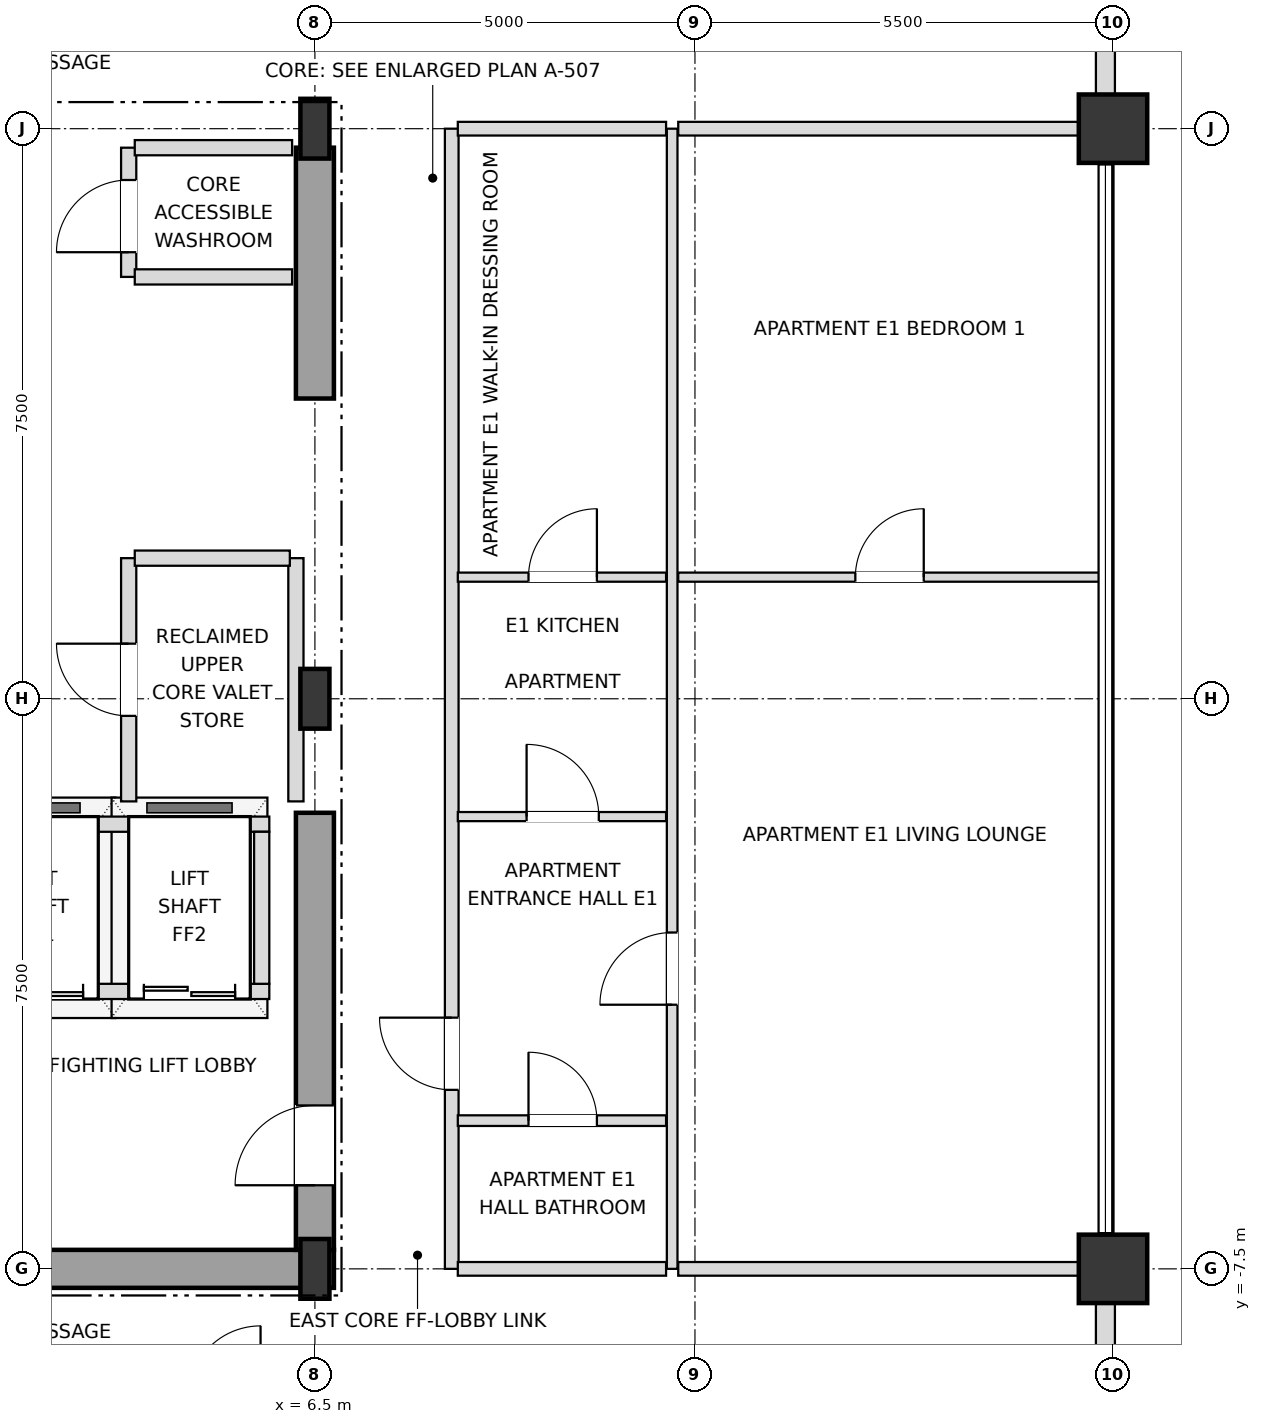
"""IFC4 building model, lengths in metres.
Left out: names, types, materials, properties, quantities, classifications, styles, units other than length and angle.
Written with IfcOpenShell. Run it as: python <this file> out.ifc"""

import sys

from ifc_helpers import new_model, si_unit, direction, frame, frame_2d, origin, origin_2d, place, context, subcontext, project, spatial, rectangle, i_section, extrude, element, fill, save


model = new_model("IFC4")
c1 = context("Model", 3, precision=1e-05, world=origin(), true_north=direction((0.0, 1.0)))
c2 = subcontext(c1, "Body", "Model", "MODEL_VIEW")
j1 = project(units=[si_unit("LENGTHUNIT", "METRE"), si_unit("PLANEANGLEUNIT", "RADIAN")], contexts=[c1])
p1 = place(None, origin())
s1 = spatial("IfcSite", under=j1, at=p1, CompositionType="ELEMENT")
p2 = place(p1, origin())
s2 = spatial("IfcBuilding", under=s1, at=p2, CompositionType="ELEMENT")
p3 = place(p2, frame((0.0, 0.0, 236.7)))
s3 = spatial("IfcBuildingStorey", under=s2, at=p3, CompositionType="ELEMENT", Elevation=236.7)
for number, where, z_axis, x_axis in (
    (1, (6.5, -7.5, 0.0), (0.0, 0.0, 1.0), (1.0, 0.0, 0.0)),
    (2, (6.5, 0.0, 0.0), (0.0, 0.0, 1.0), (1.0, 0.0, 0.0)),
    (3, (6.5, 7.5, 0.0), (0.0, 0.0, 1.0), (1.0, 0.0, 0.0)),
):
    element("IfcColumn", number, at=place(p3, frame(where, z_axis=z_axis, x_axis=x_axis)), inside=s3, PredefinedType="COLUMN", context=c2, shape_type="SweptSolid", body=[
        extrude(i_section(OverallWidth=0.382, OverallDepth=0.786, WebThickness=0.02, FlangeThickness=0.033, at=origin_2d()), origin(), (0.0, 0.0, 1.0), 3.6),
    ])
for number, where, z_axis, x_axis in (
    (4, (17.0, -7.5, 0.0), (0.0, 0.0, 1.0), (1.0, 0.0, 0.0)),
    (5, (17.0, 7.5, 0.0), (0.0, 0.0, 1.0), (1.0, 0.0, 0.0)),
):
    element("IfcColumn", number, at=place(p3, frame(where, z_axis=z_axis, x_axis=x_axis)), inside=s3, PredefinedType="USERDEFINED", context=c2, shape_type="SweptSolid", body=[
        extrude(rectangle(XDim=0.9, YDim=0.9, at=origin_2d()), origin(), (0.0, 0.0, 1.0), 3.6),
    ])
p4 = place(p3, frame((16.9, -12.555, 0.0), z_axis=(0.0, 0.0, 1.0), x_axis=(0.0, 1.0, 0.0)))
e6 = element("IfcWall", 6, at=p4, inside=s3, PredefinedType="SOLIDWALL", context=c2, shape_type="SweptSolid", body=[
    extrude(rectangle(XDim=4.61, YDim=0.25, at=frame_2d((2.305, 0.0))), origin(), (0.0, 0.0, 1.0), 2.748),
])
p5 = place(p4, frame((1.405, 0.0, 0.72)))
e7 = element("IfcOpeningElement", 7, at=p5, cuts=e6, PredefinedType="OPENING", context=c2, shape_type="SweptSolid", body=[
    extrude(rectangle(XDim=1.8, YDim=1.68, at=frame_2d((0.9, 0.84))), frame((0.0, 0.135, 0.0), z_axis=(0.0, -1.0, 0.0), x_axis=(1.0, 0.0, 0.0)), (0.0, 0.0, 1.0), 0.27),
])
p6 = place(p3, frame((16.9, 7.945, 0.0), z_axis=(0.0, 0.0, 1.0), x_axis=(0.0, 1.0, 0.0)))
e8 = element("IfcWall", 8, at=p6, inside=s3, PredefinedType="SOLIDWALL", context=c2, shape_type="SweptSolid", body=[
    extrude(rectangle(XDim=4.61, YDim=0.25, at=frame_2d((2.305, 0.0))), origin(), (0.0, 0.0, 1.0), 2.748),
])
p7 = place(p6, frame((1.405, 0.0, 0.72)))
e9 = element("IfcOpeningElement", 9, at=p7, cuts=e8, PredefinedType="OPENING", context=c2, shape_type="SweptSolid", body=[
    extrude(rectangle(XDim=1.8, YDim=1.68, at=frame_2d((0.9, 0.84))), frame((0.0, 0.135, 0.0), z_axis=(0.0, -1.0, 0.0), x_axis=(1.0, 0.0, 0.0)), (0.0, 0.0, 1.0), 0.27),
])
p8 = place(p3, frame((0.0, -7.5, 0.0), z_axis=(0.0, 0.0, 1.0), x_axis=(1.0, 0.0, 0.0)))
e10 = element("IfcWall", 10, at=p8, inside=s3, PredefinedType="SHEAR", context=c2, shape_type="SweptSolid", body=[
    extrude(rectangle(XDim=6.75, YDim=0.5, at=frame_2d((3.375, 0.0))), origin(), (0.0, 0.0, 1.0), 3.38),
])
p9 = place(p3, frame((6.5, -7.25, 0.0), z_axis=(0.0, 0.0, 1.0), x_axis=(0.0, 1.0, 0.0)))
e11 = element("IfcWall", 11, at=p9, inside=s3, PredefinedType="SHEAR", context=c2, shape_type="SweptSolid", body=[
    extrude(rectangle(XDim=5.75, YDim=0.5, at=frame_2d((2.875, 0.0))), origin(), (0.0, 0.0, 1.0), 3.38),
])
p10 = place(p9, frame((0.85, 0.0, 0.0)))
e12 = element("IfcOpeningElement", 12, at=p10, cuts=e11, PredefinedType="OPENING", context=c2, shape_type="SweptSolid", body=[
    extrude(rectangle(XDim=1.05, YDim=2.15, at=frame_2d((0.525, 1.075))), frame((0.0, 0.26, 0.0), z_axis=(0.0, -1.0, 0.0), x_axis=(1.0, 0.0, 0.0)), (0.0, 0.0, 1.0), 0.52),
])
p11 = place(p3, frame((6.5, 3.95, 0.0), z_axis=(0.0, 0.0, 1.0), x_axis=(0.0, 1.0, 0.0)))
e13 = element("IfcWall", 13, at=p11, inside=s3, PredefinedType="SHEAR", context=c2, shape_type="SweptSolid", body=[
    extrude(rectangle(XDim=3.3, YDim=0.5, at=frame_2d((1.65, 0.0))), origin(), (0.0, 0.0, 1.0), 3.38),
])
p12 = place(p3, frame((1.8, -3.85, 0.0), z_axis=(0.0, 0.0, 1.0), x_axis=(1.0, 0.0, 0.0)))
e14 = element("IfcWall", 14, at=p12, inside=s3, PredefinedType="SOLIDWALL", context=c2, shape_type="SweptSolid", body=[
    extrude(rectangle(XDim=4.1, YDim=0.2, at=frame_2d((2.05, 0.0))), origin(), (0.0, 0.0, 1.0), 3.38),
])
p13 = place(p12, frame((0.45, 0.0, 0.0)))
e15 = element("IfcOpeningElement", 15, at=p13, cuts=e14, PredefinedType="OPENING", context=c2, shape_type="SweptSolid", body=[
    extrude(rectangle(XDim=1.2, YDim=2.2, at=frame_2d((0.6, 1.1))), frame((0.0, 0.11, 0.0), z_axis=(0.0, -1.0, 0.0), x_axis=(1.0, 0.0, 0.0)), (0.0, 0.0, 1.0), 0.22),
])
p14 = place(p12, frame((2.45, 0.0, 0.0)))
e16 = element("IfcOpeningElement", 16, at=p14, cuts=e14, PredefinedType="OPENING", context=c2, shape_type="SweptSolid", body=[
    extrude(rectangle(XDim=1.2, YDim=2.2, at=frame_2d((0.6, 1.1))), frame((0.0, 0.11, 0.0), z_axis=(0.0, -1.0, 0.0), x_axis=(1.0, 0.0, 0.0)), (0.0, 0.0, 1.0), 0.22),
])
p15 = place(p3, frame((1.8, -1.65, 0.0), z_axis=(0.0, 0.0, 1.0), x_axis=(1.0, 0.0, 0.0)))
e17 = element("IfcWall", 17, at=p15, inside=s3, PredefinedType="SOLIDWALL", context=c2, shape_type="SweptSolid", body=[
    extrude(rectangle(XDim=4.1, YDim=0.2, at=frame_2d((2.05, 0.0))), origin(), (0.0, 0.0, 1.0), 3.38),
])
p16 = place(p3, frame((5.8, -3.75, 0.0), z_axis=(0.0, 0.0, 1.0), x_axis=(0.0, 1.0, 0.0)))
e18 = element("IfcWall", 18, at=p16, inside=s3, PredefinedType="SOLIDWALL", context=c2, shape_type="SweptSolid", body=[
    extrude(rectangle(XDim=2.0, YDim=0.2, at=frame_2d((1.0, 0.0))), origin(), (0.0, 0.0, 1.0), 3.38),
])
p17 = place(p3, frame((4.05, -1.35, 0.0), z_axis=(0.0, 0.0, 1.0), x_axis=(0.0, 1.0, 0.0)))
e19 = element("IfcWall", 19, at=p17, inside=s3, PredefinedType="SOLIDWALL", context=c2, shape_type="SweptSolid", body=[
    extrude(rectangle(XDim=3.2, YDim=0.2, at=frame_2d((1.6, 0.0))), origin(), (0.0, 0.0, 1.0), 3.38),
])
p18 = place(p17, frame((1.125, 0.0, 0.0)))
e20 = element("IfcOpeningElement", 20, at=p18, cuts=e19, PredefinedType="OPENING", context=c2, shape_type="SweptSolid", body=[
    extrude(rectangle(XDim=0.95, YDim=2.15, at=frame_2d((0.475, 1.075))), frame((0.0, 0.11, 0.0), z_axis=(0.0, -1.0, 0.0), x_axis=(1.0, 0.0, 0.0)), (0.0, 0.0, 1.0), 0.22),
])
p19 = place(p3, frame((4.05, 5.55, 0.0), z_axis=(0.0, 0.0, 1.0), x_axis=(0.0, 1.0, 0.0)))
e21 = element("IfcWall", 21, at=p19, inside=s3, PredefinedType="SOLIDWALL", context=c2, shape_type="SweptSolid", body=[
    extrude(rectangle(XDim=1.7, YDim=0.2, at=frame_2d((0.85, 0.0))), origin(), (0.0, 0.0, 1.0), 3.38),
])
p20 = place(p19, frame((0.325, 0.0, 0.0)))
e22 = element("IfcOpeningElement", 22, at=p20, cuts=e21, PredefinedType="OPENING", context=c2, shape_type="SweptSolid", body=[
    extrude(rectangle(XDim=0.95, YDim=2.15, at=frame_2d((0.475, 1.075))), frame((0.0, 0.11, 0.0), z_axis=(0.0, -1.0, 0.0), x_axis=(1.0, 0.0, 0.0)), (0.0, 0.0, 1.0), 0.22),
])
p21 = place(p3, frame((6.25, -1.35, 0.0), z_axis=(0.0, 0.0, 1.0), x_axis=(0.0, 1.0, 0.0)))
e23 = element("IfcWall", 23, at=p21, inside=s3, PredefinedType="SOLIDWALL", context=c2, shape_type="SweptSolid", body=[
    extrude(rectangle(XDim=3.2, YDim=0.2, at=frame_2d((1.6, 0.0))), origin(), (0.0, 0.0, 1.0), 3.38),
])
p22 = place(p3, frame((8.3, -7.5, 0.0), z_axis=(0.0, 0.0, 1.0), x_axis=(0.0, 1.0, 0.0)))
e24 = element("IfcWall", 24, at=p22, inside=s3, PredefinedType="PARTITIONING", context=c2, shape_type="SweptSolid", body=[
    extrude(rectangle(XDim=15.0, YDim=0.18, at=frame_2d((7.5, 0.0))), origin(), (0.0, 0.0, 1.0), 3.38),
])
p23 = place(p22, frame((2.355, 0.0, 0.0)))
e25 = element("IfcOpeningElement", 25, at=p23, cuts=e24, PredefinedType="OPENING", context=c2, shape_type="SweptSolid", body=[
    extrude(rectangle(XDim=0.95, YDim=2.15, at=frame_2d((0.475, 1.075))), frame((0.0, 0.1, 0.0), z_axis=(0.0, -1.0, 0.0), x_axis=(1.0, 0.0, 0.0)), (0.0, 0.0, 1.0), 0.2),
])
p24 = place(p3, frame((11.2, -7.5, 0.0), z_axis=(0.0, 0.0, 1.0), x_axis=(0.0, 1.0, 0.0)))
e26 = element("IfcWall", 26, at=p24, inside=s3, PredefinedType="PARTITIONING", context=c2, shape_type="SweptSolid", body=[
    extrude(rectangle(XDim=15.0, YDim=0.14, at=frame_2d((7.5, 0.0))), origin(), (0.0, 0.0, 1.0), 3.38),
])
p25 = place(p24, frame((3.475, 0.0, 0.0)))
e27 = element("IfcOpeningElement", 27, at=p25, cuts=e26, PredefinedType="OPENING", context=c2, shape_type="SweptSolid", body=[
    extrude(rectangle(XDim=0.95, YDim=2.1, at=frame_2d((0.475, 1.05))), frame((0.0, 0.08, 0.0), z_axis=(0.0, -1.0, 0.0), x_axis=(1.0, 0.0, 0.0)), (0.0, 0.0, 1.0), 0.16),
])
p26 = place(p3, frame((8.38, -7.5, 0.0), z_axis=(0.0, 0.0, 1.0), x_axis=(1.0, 0.0, 0.0)))
e28 = element("IfcWall", 28, at=p26, inside=s3, PredefinedType="PARTITIONING", context=c2, shape_type="SweptSolid", body=[
    extrude(rectangle(XDim=2.74, YDim=0.18, at=frame_2d((1.37, 0.0))), origin(), (0.0, 0.0, 1.0), 2.826),
])
p27 = place(p3, frame((11.28, -7.5, 0.0), z_axis=(0.0, 0.0, 1.0), x_axis=(1.0, 0.0, 0.0)))
e29 = element("IfcWall", 29, at=p27, inside=s3, PredefinedType="PARTITIONING", context=c2, shape_type="SweptSolid", body=[
    extrude(rectangle(XDim=5.62, YDim=0.18, at=frame_2d((2.81, 0.0))), origin(), (0.0, 0.0, 1.0), 2.826),
])
p28 = place(p3, frame((8.38, -5.55, 0.0), z_axis=(0.0, 0.0, 1.0), x_axis=(1.0, 0.0, 0.0)))
e30 = element("IfcWall", 30, at=p28, inside=s3, PredefinedType="PARTITIONING", context=c2, shape_type="SweptSolid", body=[
    extrude(rectangle(XDim=2.74, YDim=0.14, at=frame_2d((1.37, 0.0))), origin(), (0.0, 0.0, 1.0), 3.38),
])
p29 = place(p28, frame((0.93, 0.0, 0.0)))
e31 = element("IfcOpeningElement", 31, at=p29, cuts=e30, PredefinedType="OPENING", context=c2, shape_type="SweptSolid", body=[
    extrude(rectangle(XDim=0.9, YDim=2.1, at=frame_2d((0.45, 1.05))), frame((0.0, 0.08, 0.0), z_axis=(0.0, -1.0, 0.0), x_axis=(1.0, 0.0, 0.0)), (0.0, 0.0, 1.0), 0.16),
])
p30 = place(p3, frame((8.38, -1.55, 0.0), z_axis=(0.0, 0.0, 1.0), x_axis=(1.0, 0.0, 0.0)))
e32 = element("IfcWall", 32, at=p30, inside=s3, PredefinedType="PARTITIONING", context=c2, shape_type="SweptSolid", body=[
    extrude(rectangle(XDim=2.74, YDim=0.12, at=frame_2d((1.37, 0.0))), origin(), (0.0, 0.0, 1.0), 3.38),
])
p31 = place(p30, frame((0.905, 0.0, 0.0)))
e33 = element("IfcOpeningElement", 33, at=p31, cuts=e32, PredefinedType="OPENING", context=c2, shape_type="SweptSolid", body=[
    extrude(rectangle(XDim=0.95, YDim=2.1, at=frame_2d((0.475, 1.05))), frame((0.0, 0.07, 0.0), z_axis=(0.0, -1.0, 0.0), x_axis=(1.0, 0.0, 0.0)), (0.0, 0.0, 1.0), 0.14),
])
p32 = place(p3, frame((8.38, 1.6, 0.0), z_axis=(0.0, 0.0, 1.0), x_axis=(1.0, 0.0, 0.0)))
e34 = element("IfcWall", 34, at=p32, inside=s3, PredefinedType="PARTITIONING", context=c2, shape_type="SweptSolid", body=[
    extrude(rectangle(XDim=2.74, YDim=0.12, at=frame_2d((1.37, 0.0))), origin(), (0.0, 0.0, 1.0), 3.38),
])
p33 = place(p32, frame((0.93, 0.0, 0.0)))
e35 = element("IfcOpeningElement", 35, at=p33, cuts=e34, PredefinedType="OPENING", context=c2, shape_type="SweptSolid", body=[
    extrude(rectangle(XDim=0.9, YDim=2.1, at=frame_2d((0.45, 1.05))), frame((0.0, 0.07, 0.0), z_axis=(0.0, -1.0, 0.0), x_axis=(1.0, 0.0, 0.0)), (0.0, 0.0, 1.0), 0.14),
])
p34 = place(p3, frame((11.28, 1.6, 0.0), z_axis=(0.0, 0.0, 1.0), x_axis=(1.0, 0.0, 0.0)))
e36 = element("IfcWall", 36, at=p34, inside=s3, PredefinedType="PARTITIONING", context=c2, shape_type="SweptSolid", body=[
    extrude(rectangle(XDim=5.54, YDim=0.12, at=frame_2d((2.77, 0.0))), origin(), (0.0, 0.0, 1.0), 3.018),
])
p35 = place(p34, frame((2.33, 0.0, 0.0)))
e37 = element("IfcOpeningElement", 37, at=p35, cuts=e36, PredefinedType="OPENING", context=c2, shape_type="SweptSolid", body=[
    extrude(rectangle(XDim=0.9, YDim=2.1, at=frame_2d((0.45, 1.05))), frame((0.0, 0.07, 0.0), z_axis=(0.0, -1.0, 0.0), x_axis=(1.0, 0.0, 0.0)), (0.0, 0.0, 1.0), 0.14),
])
p36 = place(p3, frame((4.13, 1.85, 0.0), z_axis=(0.0, 0.0, 1.0), x_axis=(1.0, 0.0, 0.0)))
e38 = element("IfcWall", 38, at=p36, inside=s3, PredefinedType="SOLIDWALL", context=c2, shape_type="SweptSolid", body=[
    extrude(rectangle(XDim=2.04, YDim=0.2, at=frame_2d((1.02, 0.0))), origin(), (0.0, 0.0, 1.0), 3.38),
])
for number, where, z_axis, x_axis in (
    (39, (4.13, 5.55, 0.0), (0.0, 0.0, 1.0), (1.0, 0.0, 0.0)),
    (40, (4.13, 7.25, 0.0), (0.0, 0.0, 1.0), (1.0, 0.0, 0.0)),
):
    element("IfcWall", number, at=place(p3, frame(where, z_axis=z_axis, x_axis=x_axis)), inside=s3, PredefinedType="SOLIDWALL", context=c2, shape_type="SweptSolid", body=[
        extrude(rectangle(XDim=2.07, YDim=0.2, at=frame_2d((1.035, 0.0))), origin(), (0.0, 0.0, 1.0), 3.38),
    ])
p37 = place(p3, frame((8.38, 7.5, 0.0), z_axis=(0.0, 0.0, 1.0), x_axis=(1.0, 0.0, 0.0)))
e41 = element("IfcWall", 41, at=p37, inside=s3, PredefinedType="PARTITIONING", context=c2, shape_type="SweptSolid", body=[
    extrude(rectangle(XDim=2.74, YDim=0.18, at=frame_2d((1.37, 0.0))), origin(), (0.0, 0.0, 1.0), 2.826),
])
p38 = place(p3, frame((11.28, 7.5, 0.0), z_axis=(0.0, 0.0, 1.0), x_axis=(1.0, 0.0, 0.0)))
e42 = element("IfcWall", 42, at=p38, inside=s3, PredefinedType="PARTITIONING", context=c2, shape_type="SweptSolid", body=[
    extrude(rectangle(XDim=5.62, YDim=0.18, at=frame_2d((2.81, 0.0))), origin(), (0.0, 0.0, 1.0), 2.826),
])
p39 = place(p10, origin())
e43 = element("IfcDoor", 43, at=p39, inside=s3, OperationType="SINGLE_SWING_LEFT", PredefinedType="DOOR", context=c2, shape_type="SweptSolid", body=[
    extrude(rectangle(XDim=1.05, YDim=2.15, at=frame_2d((0.525, 1.075))), frame((0.0, 0.025, 0.0), z_axis=(0.0, -1.0, 0.0), x_axis=(1.0, 0.0, 0.0)), (0.0, 0.0, 1.0), 0.05),
])
fill(e12, e43)
p40 = place(p13, origin())
e44 = element("IfcDoor", 44, at=p40, inside=s3, OperationType="DOUBLE_DOOR_SLIDING", PredefinedType="DOOR", context=c2, shape_type="SweptSolid", body=[
    extrude(rectangle(XDim=1.2, YDim=2.2, at=frame_2d((0.6, 1.1))), frame((0.0, 0.025, 0.0), z_axis=(0.0, -1.0, 0.0), x_axis=(1.0, 0.0, 0.0)), (0.0, 0.0, 1.0), 0.05),
])
fill(e15, e44)
p41 = place(p14, origin())
e45 = element("IfcDoor", 45, at=p41, inside=s3, OperationType="DOUBLE_DOOR_SLIDING", PredefinedType="DOOR", context=c2, shape_type="SweptSolid", body=[
    extrude(rectangle(XDim=1.2, YDim=2.2, at=frame_2d((0.6, 1.1))), frame((0.0, 0.025, 0.0), z_axis=(0.0, -1.0, 0.0), x_axis=(1.0, 0.0, 0.0)), (0.0, 0.0, 1.0), 0.05),
])
fill(e16, e45)
p42 = place(p18, origin())
e46 = element("IfcDoor", 46, at=p42, inside=s3, OperationType="SINGLE_SWING_RIGHT", PredefinedType="DOOR", context=c2, shape_type="SweptSolid", body=[
    extrude(rectangle(XDim=0.95, YDim=2.15, at=frame_2d((0.475, 1.075))), frame((0.0, 0.025, 0.0), z_axis=(0.0, -1.0, 0.0), x_axis=(1.0, 0.0, 0.0)), (0.0, 0.0, 1.0), 0.05),
])
fill(e20, e46)
p43 = place(p20, origin())
e47 = element("IfcDoor", 47, at=p43, inside=s3, OperationType="SINGLE_SWING_LEFT", PredefinedType="DOOR", context=c2, shape_type="SweptSolid", body=[
    extrude(rectangle(XDim=0.95, YDim=2.15, at=frame_2d((0.475, 1.075))), frame((0.0, 0.025, 0.0), z_axis=(0.0, -1.0, 0.0), x_axis=(1.0, 0.0, 0.0)), (0.0, 0.0, 1.0), 0.05),
])
fill(e22, e47)
p44 = place(p29, origin())
e48 = element("IfcDoor", 48, at=p44, inside=s3, OperationType="SINGLE_SWING_LEFT", PredefinedType="DOOR", context=c2, shape_type="SweptSolid", body=[
    extrude(rectangle(XDim=0.9, YDim=2.1, at=frame_2d((0.45, 1.05))), frame((0.0, 0.025, 0.0), z_axis=(0.0, -1.0, 0.0), x_axis=(1.0, 0.0, 0.0)), (0.0, 0.0, 1.0), 0.05),
])
fill(e31, e48)
p45 = place(p23, origin())
e49 = element("IfcDoor", 49, at=p45, inside=s3, OperationType="SINGLE_SWING_RIGHT", PredefinedType="DOOR", context=c2, shape_type="SweptSolid", body=[
    extrude(rectangle(XDim=0.95, YDim=2.15, at=frame_2d((0.475, 1.075))), frame((0.0, 0.025, 0.0), z_axis=(0.0, -1.0, 0.0), x_axis=(1.0, 0.0, 0.0)), (0.0, 0.0, 1.0), 0.05),
])
fill(e25, e49)
p46 = place(p31, origin())
e50 = element("IfcDoor", 50, at=p46, inside=s3, OperationType="SINGLE_SWING_LEFT", PredefinedType="DOOR", context=c2, shape_type="SweptSolid", body=[
    extrude(rectangle(XDim=0.95, YDim=2.1, at=frame_2d((0.475, 1.05))), frame((0.0, 0.025, 0.0), z_axis=(0.0, -1.0, 0.0), x_axis=(1.0, 0.0, 0.0)), (0.0, 0.0, 1.0), 0.05),
])
fill(e33, e50)
p47 = place(p33, origin())
e51 = element("IfcDoor", 51, at=p47, inside=s3, OperationType="SINGLE_SWING_RIGHT", PredefinedType="DOOR", context=c2, shape_type="SweptSolid", body=[
    extrude(rectangle(XDim=0.9, YDim=2.1, at=frame_2d((0.45, 1.05))), frame((0.0, 0.025, 0.0), z_axis=(0.0, -1.0, 0.0), x_axis=(1.0, 0.0, 0.0)), (0.0, 0.0, 1.0), 0.05),
])
fill(e35, e51)
p48 = place(p25, origin())
e52 = element("IfcDoor", 52, at=p48, inside=s3, OperationType="SINGLE_SWING_LEFT", PredefinedType="DOOR", context=c2, shape_type="SweptSolid", body=[
    extrude(rectangle(XDim=0.95, YDim=2.1, at=frame_2d((0.475, 1.05))), frame((0.0, 0.025, 0.0), z_axis=(0.0, -1.0, 0.0), x_axis=(1.0, 0.0, 0.0)), (0.0, 0.0, 1.0), 0.05),
])
fill(e27, e52)
p49 = place(p35, origin())
e53 = element("IfcDoor", 53, at=p49, inside=s3, OperationType="SINGLE_SWING_RIGHT", PredefinedType="DOOR", context=c2, shape_type="SweptSolid", body=[
    extrude(rectangle(XDim=0.9, YDim=2.1, at=frame_2d((0.45, 1.05))), frame((0.0, 0.025, 0.0), z_axis=(0.0, -1.0, 0.0), x_axis=(1.0, 0.0, 0.0)), (0.0, 0.0, 1.0), 0.05),
])
fill(e37, e53)
save(model, sys.argv[1])
